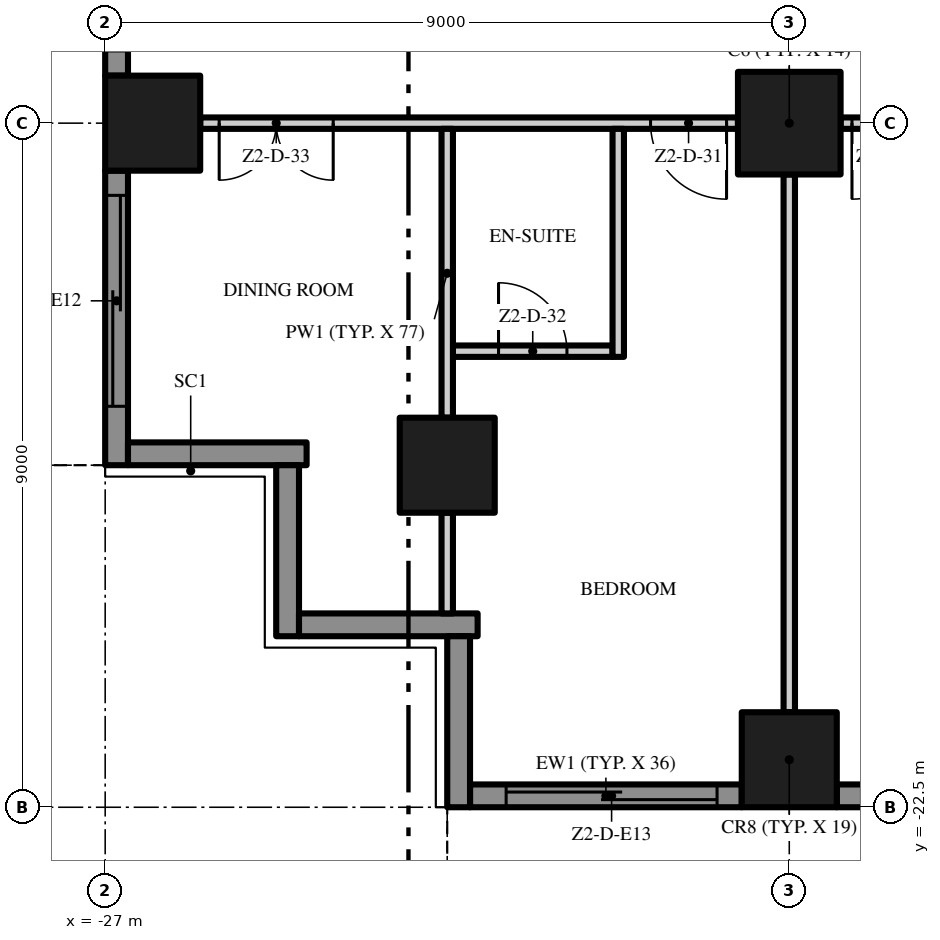
"""IFC4 building model, lengths in metres.
Left out: names, types, materials, properties, quantities, classifications, styles, units other than length and angle.
Written with IfcOpenShell. Run it as: python <this file> out.ifc"""

import sys

from ifc_helpers import new_model, si_unit, direction, frame, frame_2d, origin, origin_2d, place, context, subcontext, project, spatial, polyline, rectangle, outline, extrude, element, fill, save


model = new_model("IFC4")
c1 = context("Model", 3, precision=1e-05, world=origin(), true_north=direction((0.0, 1.0)))
c2 = subcontext(c1, "Body", "Model", "MODEL_VIEW")
j1 = project(units=[si_unit("LENGTHUNIT", "METRE"), si_unit("PLANEANGLEUNIT", "RADIAN")], contexts=[c1])
p1 = place(None, origin())
s1 = spatial("IfcSite", under=j1, at=p1, CompositionType="ELEMENT")
p2 = place(p1, origin())
s2 = spatial("IfcBuilding", under=s1, at=p2, CompositionType="ELEMENT")
p3 = place(p2, frame((0.0, 0.0, 111.2)))
s3 = spatial("IfcBuildingStorey", under=s2, at=p3, CompositionType="ELEMENT", Elevation=111.2)
p4 = place(p3, frame((-18.0, -13.5, 0.0), z_axis=(0.0, 0.0, 1.0), x_axis=(1.0, 0.0, 0.0)))
e1 = element("IfcColumn", 1, at=p4, inside=s3, PredefinedType="COLUMN", context=c2, shape_type="SweptSolid", body=[
    extrude(rectangle(XDim=1.35, YDim=1.35, at=origin_2d()), origin(), (0.0, 0.0, 1.0), 3.5),
])
for number, where, z_axis, x_axis in (
    (2, (-18.0, -21.875, 0.0), (0.0, 0.0, 1.0), (1.0, 0.0, 0.0)),
    (3, (-26.375, -13.5, 0.0), (0.0, 0.0, 1.0), (1.0, 0.0, 0.0)),
    (4, (-22.5, -18.0, 0.0), (0.0, 0.0, 1.0), (1.0, 0.0, 0.0)),
):
    element("IfcColumn", number, at=place(p3, frame(where, z_axis=z_axis, x_axis=x_axis)), inside=s3, PredefinedType="COLUMN", context=c2, shape_type="SweptSolid", body=[
        extrude(rectangle(XDim=1.25, YDim=1.25, at=origin_2d()), origin(), (0.0, 0.0, 1.0), 3.5),
    ])
p5 = place(p3, frame((-18.625, -22.35, 0.0), z_axis=(0.0, 0.0, 1.0), x_axis=(-1.0, 0.0, 0.0)))
e5 = element("IfcWall", 5, at=p5, inside=s3, PredefinedType="SOLIDWALL", context=c2, shape_type="SweptSolid", body=[
    extrude(rectangle(XDim=3.575, YDim=0.3, at=frame_2d((1.788, 0.0))), origin(), (0.0, 0.0, 1.0), 3.5),
])
p6 = place(p5, frame((0.325, 0.0, 0.0)))
e6 = element("IfcOpeningElement", 6, at=p6, cuts=e5, PredefinedType="OPENING", context=c2, shape_type="SweptSolid", body=[
    extrude(rectangle(XDim=2.775, YDim=2.4, at=frame_2d((1.387, 1.2))), frame((0.0, 0.16, 0.0), z_axis=(0.0, -1.0, 0.0), x_axis=(1.0, 0.0, 0.0)), (0.0, 0.0, 1.0), 0.32),
])
p7 = place(p3, frame((-9.625, -22.35, 0.0), z_axis=(0.0, 0.0, 1.0), x_axis=(-1.0, 0.0, 0.0)))
e7 = element("IfcWall", 7, at=p7, inside=s3, PredefinedType="SOLIDWALL", context=c2, shape_type="SweptSolid", body=[
    extrude(rectangle(XDim=7.75, YDim=0.3, at=frame_2d((3.875, 0.0))), origin(), (0.0, 0.0, 1.0), 3.5),
])
p8 = place(p7, frame((4.65, 0.0, 0.45)))
e8 = element("IfcOpeningElement", 8, at=p8, cuts=e7, PredefinedType="OPENING", context=c2, shape_type="SweptSolid", body=[
    extrude(rectangle(XDim=2.775, YDim=2.65, at=frame_2d((1.387, 1.325))), frame((0.0, 0.16, 0.0), z_axis=(0.0, -1.0, 0.0), x_axis=(1.0, 0.0, 0.0)), (0.0, 0.0, 1.0), 0.32),
])
p9 = place(p7, frame((0.325, 0.0, 0.45)))
e9 = element("IfcOpeningElement", 9, at=p9, cuts=e7, PredefinedType="OPENING", context=c2, shape_type="SweptSolid", body=[
    extrude(rectangle(XDim=2.775, YDim=2.65, at=frame_2d((1.387, 1.325))), frame((0.0, 0.16, 0.0), z_axis=(0.0, -1.0, 0.0), x_axis=(1.0, 0.0, 0.0)), (0.0, 0.0, 1.0), 0.32),
])
p10 = place(p3, frame((-26.85, -12.875, 0.0), z_axis=(0.0, 0.0, 1.0), x_axis=(0.0, 1.0, 0.0)))
e10 = element("IfcWall", 10, at=p10, inside=s3, PredefinedType="SOLIDWALL", context=c2, shape_type="SweptSolid", body=[
    extrude(rectangle(XDim=7.75, YDim=0.3, at=frame_2d((3.875, 0.0))), origin(), (0.0, 0.0, 1.0), 3.5),
])
p11 = place(p10, frame((4.65, 0.0, 0.45)))
e11 = element("IfcOpeningElement", 11, at=p11, cuts=e10, PredefinedType="OPENING", context=c2, shape_type="SweptSolid", body=[
    extrude(rectangle(XDim=2.775, YDim=2.65, at=frame_2d((1.387, 1.325))), frame((0.0, 0.16, 0.0), z_axis=(0.0, -1.0, 0.0), x_axis=(1.0, 0.0, 0.0)), (0.0, 0.0, 1.0), 0.32),
])
p12 = place(p10, frame((0.325, 0.0, 0.0)))
e12 = element("IfcOpeningElement", 12, at=p12, cuts=e10, PredefinedType="OPENING", context=c2, shape_type="SweptSolid", body=[
    extrude(rectangle(XDim=2.775, YDim=2.4, at=frame_2d((1.387, 1.2))), frame((0.0, 0.16, 0.0), z_axis=(0.0, -1.0, 0.0), x_axis=(1.0, 0.0, 0.0)), (0.0, 0.0, 1.0), 0.32),
])
p13 = place(p3, frame((-26.85, -18.0, 0.0), z_axis=(0.0, 0.0, 1.0), x_axis=(0.0, 1.0, 0.0)))
e13 = element("IfcWall", 13, at=p13, inside=s3, PredefinedType="SOLIDWALL", context=c2, shape_type="SweptSolid", body=[
    extrude(rectangle(XDim=3.875, YDim=0.3, at=frame_2d((1.938, 0.0))), origin(), (0.0, 0.0, 1.0), 3.5),
])
p14 = place(p13, frame((0.775, 0.0, 0.0)))
e14 = element("IfcOpeningElement", 14, at=p14, cuts=e13, PredefinedType="OPENING", context=c2, shape_type="SweptSolid", body=[
    extrude(rectangle(XDim=2.775, YDim=2.4, at=frame_2d((1.387, 1.2))), frame((0.0, 0.16, 0.0), z_axis=(0.0, -1.0, 0.0), x_axis=(1.0, 0.0, 0.0)), (0.0, 0.0, 1.0), 0.32),
])
p15 = place(p3, frame((-24.35, -17.85, 0.0), z_axis=(0.0, 0.0, 1.0), x_axis=(-1.0, 0.0, 0.0)))
e15 = element("IfcWall", 15, at=p15, inside=s3, PredefinedType="SOLIDWALL", context=c2, shape_type="SweptSolid", body=[
    extrude(rectangle(XDim=2.35, YDim=0.3, at=frame_2d((1.175, 0.0))), origin(), (0.0, 0.0, 1.0), 3.5),
])
p16 = place(p3, frame((-24.6, -20.25, 0.0), z_axis=(0.0, 0.0, 1.0), x_axis=(0.0, 1.0, 0.0)))
e16 = element("IfcWall", 16, at=p16, inside=s3, PredefinedType="SOLIDWALL", context=c2, shape_type="SweptSolid", body=[
    extrude(rectangle(XDim=2.25, YDim=0.3, at=frame_2d((1.125, 0.0))), origin(), (0.0, 0.0, 1.0), 3.5),
])
p17 = place(p3, frame((-22.1, -20.1, 0.0), z_axis=(0.0, 0.0, 1.0), x_axis=(-1.0, 0.0, 0.0)))
e17 = element("IfcWall", 17, at=p17, inside=s3, PredefinedType="SOLIDWALL", context=c2, shape_type="SweptSolid", body=[
    extrude(rectangle(XDim=2.35, YDim=0.3, at=frame_2d((1.175, 0.0))), origin(), (0.0, 0.0, 1.0), 3.5),
])
p18 = place(p3, frame((-22.35, -22.5, 0.0), z_axis=(0.0, 0.0, 1.0), x_axis=(0.0, 1.0, 0.0)))
e18 = element("IfcWall", 18, at=p18, inside=s3, PredefinedType="SOLIDWALL", context=c2, shape_type="SweptSolid", body=[
    extrude(rectangle(XDim=2.25, YDim=0.3, at=frame_2d((1.125, 0.0))), origin(), (0.0, 0.0, 1.0), 3.5),
])
p19 = place(p3, origin())
e19 = element("IfcWall", 19, at=p19, inside=s3, PredefinedType="USERDEFINED", context=c2, shape_type="SweptSolid", body=[
    extrude(outline(polyline([(-22.5, -25.149), (-21.0, -25.485), (-20.625, -25.5), (-19.5, -25.369), (-18.0, -24.845), (-16.5, -24.112), (-15.0, -23.451), (-13.5, -23.115), (-13.125, -23.1), (-12.0, -23.231), (-10.5, -23.755), (-9.0, -24.488), (-7.5, -25.149), (-6.0, -25.485), (-5.625, -25.5), (-4.5, -25.369), (-3.0, -24.845), (-1.5, -24.112), (0.0, -23.451), (1.5, -23.115), (1.875, -23.1), (3.0, -23.231), (4.5, -23.755), (6.0, -24.488), (7.5, -25.149), (9.0, -25.485), (9.375, -25.5), (10.5, -25.369), (12.0, -24.845), (13.5, -24.112), (15.0, -23.451), (16.5, -23.115), (16.875, -23.1), (18.0, -23.231), (19.5, -23.755), (21.0, -24.488), (22.5, -25.149), (22.601, -24.92), (21.105, -24.261), (19.596, -23.524), (18.056, -22.986), (16.885, -22.849), (16.467, -22.866), (14.921, -23.213), (13.395, -23.885), (11.904, -24.614), (10.444, -25.124), (9.365, -25.249), (9.033, -25.236), (7.579, -24.91), (6.105, -24.261), (4.596, -23.524), (3.056, -22.986), (1.885, -22.849), (1.467, -22.866), (-0.079, -23.213), (-1.605, -23.885), (-3.096, -24.614), (-4.556, -25.124), (-5.635, -25.249), (-5.967, -25.236), (-7.421, -24.91), (-8.895, -24.261), (-10.404, -23.524), (-11.944, -22.986), (-13.115, -22.849), (-13.533, -22.866), (-15.079, -23.213), (-16.605, -23.885), (-18.096, -24.614), (-19.556, -25.124), (-20.635, -25.249), (-20.967, -25.236), (-22.445, -24.905), (-22.5, -25.149)])), origin(), (0.0, 0.0, 1.0), 0.9),
])
p20 = place(p3, origin())
e20 = element("IfcWall", 20, at=p20, inside=s3, PredefinedType="USERDEFINED", context=c2, shape_type="SweptSolid", body=[
    extrude(outline(polyline([(-29.649, 18.0), (-29.985, 16.5), (-30.0, 16.125), (-29.869, 15.0), (-29.345, 13.5), (-28.612, 12.0), (-27.951, 10.5), (-27.615, 9.0), (-27.6, 8.625), (-27.731, 7.5), (-28.255, 6.0), (-28.988, 4.5), (-29.649, 3.0), (-29.985, 1.5), (-30.0, 1.125), (-29.869, 0.0), (-29.345, -1.5), (-28.612, -3.0), (-27.951, -4.5), (-27.615, -6.0), (-27.6, -6.375), (-27.731, -7.5), (-28.255, -9.0), (-28.988, -10.5), (-29.649, -12.0), (-29.985, -13.5), (-30.0, -13.875), (-29.869, -15.0), (-29.345, -16.5), (-28.612, -18.0), (-28.388, -17.89), (-29.114, -16.404), (-29.624, -14.944), (-29.749, -13.865), (-29.736, -13.533), (-29.41, -12.079), (-28.761, -10.605), (-28.024, -9.096), (-27.486, -7.556), (-27.349, -6.385), (-27.366, -5.967), (-27.713, -4.421), (-28.385, -2.895), (-29.114, -1.404), (-29.624, 0.056), (-29.749, 1.135), (-29.736, 1.467), (-29.41, 2.921), (-28.761, 4.395), (-28.024, 5.904), (-27.486, 7.444), (-27.349, 8.615), (-27.366, 9.033), (-27.713, 10.579), (-28.385, 12.105), (-29.114, 13.596), (-29.624, 15.056), (-29.749, 16.135), (-29.736, 16.467), (-29.405, 17.945), (-29.649, 18.0)])), origin(), (0.0, 0.0, 1.0), 0.9),
])
p21 = place(p3, frame((-22.425, -16.5, 0.0), z_axis=(0.0, 0.0, 1.0), x_axis=(1.0, 0.0, 0.0)))
e21 = element("IfcWall", 21, at=p21, inside=s3, PredefinedType="PARTITIONING", context=c2, shape_type="SweptSolid", body=[
    extrude(rectangle(XDim=2.1, YDim=0.15, at=frame_2d((1.05, 0.0))), origin(), (0.0, 0.0, 1.0), 3.5),
])
p22 = place(p21, frame((0.6, 0.0, 0.0)))
e22 = element("IfcOpeningElement", 22, at=p22, cuts=e21, PredefinedType="OPENING", context=c2, shape_type="SweptSolid", body=[
    extrude(rectangle(XDim=0.9, YDim=2.1, at=frame_2d((0.45, 1.05))), frame((0.0, 0.085, 0.0), z_axis=(0.0, -1.0, 0.0), x_axis=(1.0, 0.0, 0.0)), (0.0, 0.0, 1.0), 0.17),
])
p23 = place(p3, frame((-18.675, -13.5, 0.0), z_axis=(0.0, 0.0, 1.0), x_axis=(-1.0, 0.0, 0.0)))
e23 = element("IfcWall", 23, at=p23, inside=s3, PredefinedType="PARTITIONING", context=c2, shape_type="SweptSolid", body=[
    extrude(rectangle(XDim=7.075, YDim=0.15, at=frame_2d((3.538, 0.0))), origin(), (0.0, 0.0, 1.0), 3.5),
])
p24 = place(p23, frame((0.15, 0.0, 0.0)))
e24 = element("IfcOpeningElement", 24, at=p24, cuts=e23, PredefinedType="OPENING", context=c2, shape_type="SweptSolid", body=[
    extrude(rectangle(XDim=1.0, YDim=2.4, at=frame_2d((0.5, 1.2))), frame((0.0, 0.085, 0.0), z_axis=(0.0, -1.0, 0.0), x_axis=(1.0, 0.0, 0.0)), (0.0, 0.0, 1.0), 0.17),
])
p25 = place(p23, frame((5.325, 0.0, 0.0)))
e25 = element("IfcOpeningElement", 25, at=p25, cuts=e23, PredefinedType="OPENING", context=c2, shape_type="SweptSolid", body=[
    extrude(rectangle(XDim=1.5, YDim=2.4, at=frame_2d((0.75, 1.2))), frame((0.0, 0.085, 0.0), z_axis=(0.0, -1.0, 0.0), x_axis=(1.0, 0.0, 0.0)), (0.0, 0.0, 1.0), 0.17),
])
p26 = place(p3, frame((-9.675, -13.5, 0.0), z_axis=(0.0, 0.0, 1.0), x_axis=(-1.0, 0.0, 0.0)))
e26 = element("IfcWall", 26, at=p26, inside=s3, PredefinedType="PARTITIONING", context=c2, shape_type="SweptSolid", body=[
    extrude(rectangle(XDim=7.65, YDim=0.15, at=frame_2d((3.825, 0.0))), origin(), (0.0, 0.0, 1.0), 3.5),
])
p27 = place(p26, frame((0.15, 0.0, 0.0)))
e27 = element("IfcOpeningElement", 27, at=p27, cuts=e26, PredefinedType="OPENING", context=c2, shape_type="SweptSolid", body=[
    extrude(rectangle(XDim=1.0, YDim=2.4, at=frame_2d((0.5, 1.2))), frame((0.0, 0.085, 0.0), z_axis=(0.0, -1.0, 0.0), x_axis=(1.0, 0.0, 0.0)), (0.0, 0.0, 1.0), 0.17),
])
p28 = place(p26, frame((6.5, 0.0, 0.0)))
e28 = element("IfcOpeningElement", 28, at=p28, cuts=e26, PredefinedType="OPENING", context=c2, shape_type="SweptSolid", body=[
    extrude(rectangle(XDim=1.0, YDim=2.4, at=frame_2d((0.5, 1.2))), frame((0.0, 0.085, 0.0), z_axis=(0.0, -1.0, 0.0), x_axis=(1.0, 0.0, 0.0)), (0.0, 0.0, 1.0), 0.17),
])
p29 = place(p3, frame((-22.5, -19.95, 0.0), z_axis=(0.0, 0.0, 1.0), x_axis=(0.0, 1.0, 0.0)))
e29 = element("IfcWall", 29, at=p29, inside=s3, PredefinedType="PARTITIONING", context=c2, shape_type="SweptSolid", body=[
    extrude(rectangle(XDim=1.325, YDim=0.15, at=frame_2d((0.662, 0.0))), origin(), (0.0, 0.0, 1.0), 3.5),
])
p30 = place(p3, frame((-22.5, -17.375, 0.0), z_axis=(0.0, 0.0, 1.0), x_axis=(0.0, 1.0, 0.0)))
e30 = element("IfcWall", 30, at=p30, inside=s3, PredefinedType="PARTITIONING", context=c2, shape_type="SweptSolid", body=[
    extrude(rectangle(XDim=3.8, YDim=0.15, at=frame_2d((1.9, 0.0))), origin(), (0.0, 0.0, 1.0), 3.5),
])
p31 = place(p3, frame((-20.25, -16.575, 0.0), z_axis=(0.0, 0.0, 1.0), x_axis=(0.0, 1.0, 0.0)))
e31 = element("IfcWall", 31, at=p31, inside=s3, PredefinedType="PARTITIONING", context=c2, shape_type="SweptSolid", body=[
    extrude(rectangle(XDim=3.0, YDim=0.15, at=frame_2d((1.5, 0.0))), origin(), (0.0, 0.0, 1.0), 3.5),
])
p32 = place(p3, frame((-18.0, -21.25, 0.0), z_axis=(0.0, 0.0, 1.0), x_axis=(0.0, 1.0, 0.0)))
e32 = element("IfcWall", 32, at=p32, inside=s3, PredefinedType="PARTITIONING", context=c2, shape_type="SweptSolid", body=[
    extrude(rectangle(XDim=7.075, YDim=0.15, at=frame_2d((3.538, 0.0))), origin(), (0.0, 0.0, 1.0), 3.5),
])
p33 = place(p6, origin())
e33 = element("IfcDoor", 33, at=p33, inside=s3, OperationType="SINGLE_SWING_LEFT", PredefinedType="DOOR", context=c2, shape_type="SweptSolid", body=[
    extrude(rectangle(XDim=2.775, YDim=2.4, at=frame_2d((1.387, 1.2))), frame((0.0, 0.025, 0.0), z_axis=(0.0, -1.0, 0.0), x_axis=(1.0, 0.0, 0.0)), (0.0, 0.0, 1.0), 0.05),
])
fill(e6, e33)
p34 = place(p14, origin())
e34 = element("IfcDoor", 34, at=p34, inside=s3, OperationType="SINGLE_SWING_LEFT", PredefinedType="DOOR", context=c2, shape_type="SweptSolid", body=[
    extrude(rectangle(XDim=2.775, YDim=2.4, at=frame_2d((1.387, 1.2))), frame((0.0, 0.025, 0.0), z_axis=(0.0, -1.0, 0.0), x_axis=(1.0, 0.0, 0.0)), (0.0, 0.0, 1.0), 0.05),
])
fill(e14, e34)
p35 = place(p28, origin())
e35 = element("IfcDoor", 35, at=p35, inside=s3, OperationType="SINGLE_SWING_RIGHT", PredefinedType="DOOR", context=c2, shape_type="SweptSolid", body=[
    extrude(rectangle(XDim=1.0, YDim=2.4, at=frame_2d((0.5, 1.2))), frame((0.0, 0.025, 0.0), z_axis=(0.0, -1.0, 0.0), x_axis=(1.0, 0.0, 0.0)), (0.0, 0.0, 1.0), 0.05),
])
fill(e28, e35)
p36 = place(p24, origin())
e36 = element("IfcDoor", 36, at=p36, inside=s3, OperationType="SINGLE_SWING_LEFT", PredefinedType="DOOR", context=c2, shape_type="SweptSolid", body=[
    extrude(rectangle(XDim=1.0, YDim=2.4, at=frame_2d((0.5, 1.2))), frame((0.0, 0.025, 0.0), z_axis=(0.0, -1.0, 0.0), x_axis=(1.0, 0.0, 0.0)), (0.0, 0.0, 1.0), 0.05),
])
fill(e24, e36)
p37 = place(p22, origin())
e37 = element("IfcDoor", 37, at=p37, inside=s3, OperationType="SINGLE_SWING_LEFT", PredefinedType="DOOR", context=c2, shape_type="SweptSolid", body=[
    extrude(rectangle(XDim=0.9, YDim=2.1, at=frame_2d((0.45, 1.05))), frame((0.0, 0.025, 0.0), z_axis=(0.0, -1.0, 0.0), x_axis=(1.0, 0.0, 0.0)), (0.0, 0.0, 1.0), 0.05),
])
fill(e22, e37)
p38 = place(p25, origin())
e38 = element("IfcDoor", 38, at=p38, inside=s3, OperationType="DOUBLE_DOOR_SINGLE_SWING", PredefinedType="DOOR", context=c2, shape_type="SweptSolid", body=[
    extrude(rectangle(XDim=1.5, YDim=2.4, at=frame_2d((0.75, 1.2))), frame((0.0, 0.025, 0.0), z_axis=(0.0, -1.0, 0.0), x_axis=(1.0, 0.0, 0.0)), (0.0, 0.0, 1.0), 0.05),
])
fill(e25, e38)
save(model, sys.argv[1])
